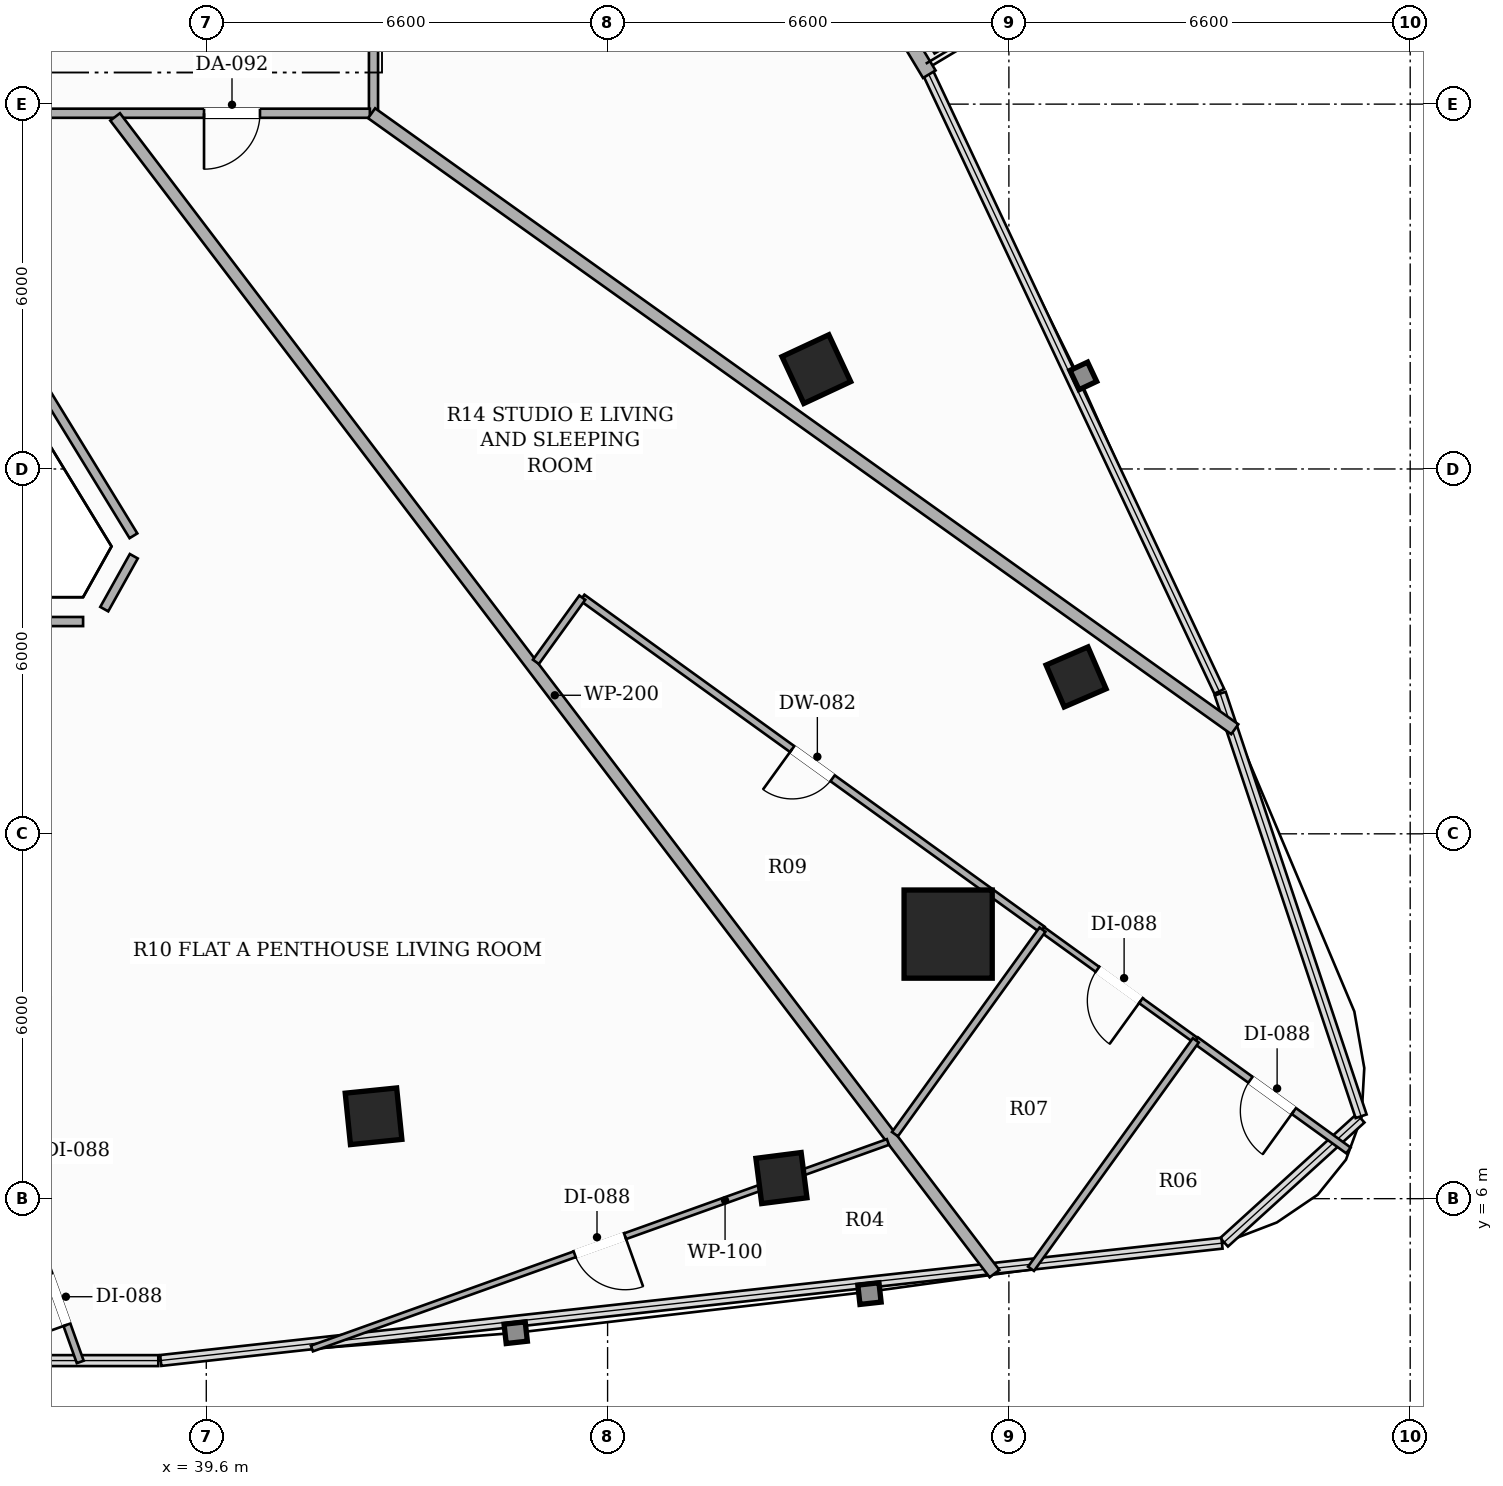
"""IFC4 building model, lengths in metres.
Left out: names, types, materials, properties, quantities, classifications, styles, units other than length and angle.
Written with IfcOpenShell. Run it as: python <this file> out.ifc"""

import sys

from ifc_helpers import new_model, si_unit, direction, frame, frame_2d, origin, origin_2d, place, context, subcontext, project, spatial, rectangle, hollow_rectangle, extrude, element, fill, save


model = new_model("IFC4")
c1 = context("Model", 3, precision=1e-05, world=origin(), true_north=direction((0.0, 1.0)))
c2 = subcontext(c1, "Body", "Model", "MODEL_VIEW")
j1 = project(units=[si_unit("LENGTHUNIT", "METRE"), si_unit("PLANEANGLEUNIT", "RADIAN")], contexts=[c1])
p1 = place(None, origin())
s1 = spatial("IfcSite", under=j1, at=p1, CompositionType="ELEMENT")
p2 = place(p1, origin())
s2 = spatial("IfcBuilding", under=s1, at=p2, CompositionType="ELEMENT")
p3 = place(p2, frame((0.0, 0.0, 143.0)))
s3 = spatial("IfcBuildingStorey", under=s2, at=p3, CompositionType="ELEMENT", Elevation=143.0)
p4 = place(p3, frame((51.801, 10.351, 0.0), z_axis=(0.0, 0.0, 1.0), x_axis=(1.0, 0.0, 0.0)))
e1 = element("IfcColumn", 1, at=p4, inside=s3, PredefinedType="COLUMN", context=c2, shape_type="SweptSolid", body=[
    extrude(hollow_rectangle(XDim=1.45, YDim=1.45, WallThickness=0.045, at=origin_2d()), origin(), (0.0, 0.0, 1.0), 3.3),
])
for number, where, z_axis, x_axis in (
    (2, (42.351, 7.355, 0.0), (0.0, 0.0, 1.0), (0.995, 0.101, 0.0)),
    (3, (49.633, 19.642, 0.0), (0.0, 0.0, 1.0), (-0.423, 0.906, 0.0)),
):
    element("IfcColumn", number, at=place(p3, frame(where, z_axis=z_axis, x_axis=x_axis)), inside=s3, PredefinedType="COLUMN", context=c2, shape_type="SweptSolid", body=[
        extrude(hollow_rectangle(XDim=0.85, YDim=0.85, WallThickness=0.028, at=origin_2d()), origin(), (0.0, 0.0, 1.0), 3.3),
    ])
for number, where, z_axis, x_axis in (
    (4, (49.059, 6.339, 0.0), (0.0, 0.0, 1.0), (0.992, 0.127, 0.0)),
    (5, (53.905, 14.58, 0.0), (0.0, 0.0, 1.0), (-0.397, 0.918, 0.0)),
):
    element("IfcColumn", number, at=place(p3, frame(where, z_axis=z_axis, x_axis=x_axis)), inside=s3, PredefinedType="COLUMN", context=c2, shape_type="SweptSolid", body=[
        extrude(hollow_rectangle(XDim=0.75, YDim=0.75, WallThickness=0.025, at=origin_2d()), origin(), (0.0, 0.0, 1.0), 3.3),
    ])
p5 = place(p3, frame((51.491, 24.492, 0.0), z_axis=(0.0, 0.0, 1.0), x_axis=(-0.514364263751, 0.857571807009, 0.0)))
e6 = element("IfcWall", 6, at=p5, inside=s3, PredefinedType="SOLIDWALL", context=c2, shape_type="SweptSolid", body=[
    extrude(rectangle(XDim=11.468, YDim=0.24, at=frame_2d((5.734, 0.0))), origin(), (0.0, 0.0, 1.0), 2.584),
])
p6 = place(p5, frame((8.972, 0.0, 0.0)))
e7 = element("IfcOpeningElement", 7, at=p6, cuts=e6, PredefinedType="OPENING", context=c2, shape_type="SweptSolid", body=[
    extrude(rectangle(XDim=1.8, YDim=2.2, at=frame_2d((0.9, 1.1))), frame((0.0, 0.13, 0.0), z_axis=(0.0, -1.0, 0.0), x_axis=(1.0, 0.0, 0.0)), (0.0, 0.0, 1.0), 0.26),
])
p7 = place(p3, frame((42.35, 28.34, 0.0), z_axis=(0.0, 0.0, 1.0), x_axis=(0.0, -1.0, 0.0)))
e8 = element("IfcWall", 8, at=p7, inside=s3, PredefinedType="PARTITIONING", context=c2, shape_type="SweptSolid", body=[
    extrude(rectangle(XDim=4.49, YDim=0.15, at=frame_2d((2.245, 0.0))), origin(), (0.0, 0.0, 1.0), 2.681),
])
p8 = place(p7, frame((1.805, 0.0, 0.0)))
e9 = element("IfcOpeningElement", 9, at=p8, cuts=e8, PredefinedType="OPENING", context=c2, shape_type="SweptSolid", body=[
    extrude(rectangle(XDim=0.88, YDim=2.1, at=frame_2d((0.44, 1.05))), frame((0.0, 0.085, 0.0), z_axis=(0.0, -1.0, 0.0), x_axis=(1.0, 0.0, 0.0)), (0.0, 0.0, 1.0), 0.17),
])
p9 = place(p3, frame((42.29, 23.85, 0.0), z_axis=(0.0, 0.0, 1.0), x_axis=(-1.0, 0.0, 0.0)))
e10 = element("IfcWall", 10, at=p9, inside=s3, PredefinedType="PARTITIONING", context=c2, shape_type="SweptSolid", body=[
    extrude(rectangle(XDim=8.134, YDim=0.15, at=frame_2d((4.067, 0.0))), origin(), (0.0, 0.0, 1.0), 2.452),
])
p10 = place(p9, frame((5.546, 0.0, 0.0)))
e11 = element("IfcOpeningElement", 11, at=p10, cuts=e10, PredefinedType="OPENING", context=c2, shape_type="SweptSolid", body=[
    extrude(rectangle(XDim=0.92, YDim=2.15, at=frame_2d((0.46, 1.075))), frame((0.0, 0.085, 0.0), z_axis=(0.0, -1.0, 0.0), x_axis=(1.0, 0.0, 0.0)), (0.0, 0.0, 1.0), 0.17),
])
p11 = place(p9, frame((1.807, 0.0, 0.0)))
e12 = element("IfcOpeningElement", 12, at=p11, cuts=e10, PredefinedType="OPENING", context=c2, shape_type="SweptSolid", body=[
    extrude(rectangle(XDim=0.92, YDim=2.15, at=frame_2d((0.46, 1.075))), frame((0.0, 0.085, 0.0), z_axis=(0.0, -1.0, 0.0), x_axis=(1.0, 0.0, 0.0)), (0.0, 0.0, 1.0), 0.17),
])
p12 = place(p3, frame((34.188, 23.79, 0.0), z_axis=(0.0, 0.0, 1.0), x_axis=(0.521816809014, -0.853057570057, 0.0)))
e13 = element("IfcWall", 13, at=p12, inside=s3, PredefinedType="PARTITIONING", context=c2, shape_type="SweptSolid", body=[
    extrude(rectangle(XDim=8.076, YDim=0.15, at=frame_2d((4.038, 0.0))), origin(), (0.0, 0.0, 1.0), 2.681),
])
p13 = place(p3, frame((38.408, 16.565, 0.0), z_axis=(0.0, 0.0, 1.0), x_axis=(-0.48761814532, -0.873057010942, 0.0)))
e14 = element("IfcWall", 14, at=p13, inside=s3, PredefinedType="PARTITIONING", context=c2, shape_type="SweptSolid", body=[
    extrude(rectangle(XDim=0.996, YDim=0.15, at=frame_2d((0.498, 0.0))), origin(), (0.0, 0.0, 1.0), 3.02),
])
p14 = place(p3, frame((37.574, 15.491, 0.0), z_axis=(0.0, 0.0, 1.0), x_axis=(-1.0, 0.0, 0.0)))
e15 = element("IfcWall", 15, at=p14, inside=s3, PredefinedType="PARTITIONING", context=c2, shape_type="SweptSolid", body=[
    extrude(rectangle(XDim=9.148, YDim=0.15, at=frame_2d((4.574, 0.0))), origin(), (0.0, 0.0, 1.0), 2.681),
])
p15 = place(p3, frame((38.101, 23.79, 0.0), z_axis=(0.0, 0.0, 1.0), x_axis=(0.605201904092, -0.796072016393, 0.0)))
e16 = element("IfcWall", 16, at=p15, inside=s3, PredefinedType="PARTITIONING", context=c2, shape_type="SweptSolid", body=[
    extrude(rectangle(XDim=23.896, YDim=0.2, at=frame_2d((11.948, 0.0))), origin(), (0.0, 0.0, 1.0), 2.373),
])
p16 = place(p3, frame((56.515, 13.72, 0.0), z_axis=(0.0, 0.0, 1.0), x_axis=(-0.813997291107, 0.580868668522, 0.0)))
e17 = element("IfcWall", 17, at=p16, inside=s3, PredefinedType="PARTITIONING", context=c2, shape_type="SweptSolid", body=[
    extrude(rectangle(XDim=17.44, YDim=0.2, at=frame_2d((8.72, 0.0))), origin(), (0.0, 0.0, 1.0), 2.373),
])
p17 = place(p3, frame((37.527, 3.315, 0.0), z_axis=(0.0, 0.0, 1.0), x_axis=(-0.337393850622, 0.9413635799, 0.0)))
e18 = element("IfcWall", 18, at=p17, inside=s3, PredefinedType="PARTITIONING", context=c2, shape_type="SweptSolid", body=[
    extrude(rectangle(XDim=2.179, YDim=0.12, at=frame_2d((1.089, 0.0))), origin(), (0.0, 0.0, 1.0), 3.02),
])
p18 = place(p17, frame((0.649, 0.0, 0.0)))
e19 = element("IfcOpeningElement", 19, at=p18, cuts=e18, PredefinedType="OPENING", context=c2, shape_type="SweptSolid", body=[
    extrude(rectangle(XDim=0.88, YDim=2.1, at=frame_2d((0.44, 1.05))), frame((0.0, 0.07, 0.0), z_axis=(0.0, -1.0, 0.0), x_axis=(1.0, 0.0, 0.0)), (0.0, 0.0, 1.0), 0.14),
])
p19 = place(p3, frame((50.81, 6.932, 0.0), z_axis=(0.0, 0.0, 1.0), x_axis=(-0.941340567411, -0.337458050943, 0.0)))
e20 = element("IfcWall", 20, at=p19, inside=s3, PredefinedType="PARTITIONING", context=c2, shape_type="SweptSolid", body=[
    extrude(rectangle(XDim=10.063, YDim=0.1, at=frame_2d((5.032, 0.0))), origin(), (0.0, 0.0, 1.0), 2.373),
])
p20 = place(p19, frame((4.592, 0.0, 0.0)))
e21 = element("IfcOpeningElement", 21, at=p20, cuts=e20, PredefinedType="OPENING", context=c2, shape_type="SweptSolid", body=[
    extrude(rectangle(XDim=0.88, YDim=2.1, at=frame_2d((0.44, 1.05))), frame((0.0, 0.06, 0.0), z_axis=(0.0, -1.0, 0.0), x_axis=(1.0, 0.0, 0.0)), (0.0, 0.0, 1.0), 0.12),
])
p21 = place(p3, frame((53.352, 10.424, 0.0), z_axis=(0.0, 0.0, 1.0), x_axis=(-0.810979209295, 0.585074971343, 0.0)))
e22 = element("IfcWall", 22, at=p21, inside=s3, PredefinedType="PARTITIONING", context=c2, shape_type="SweptSolid", body=[
    extrude(rectangle(XDim=9.332, YDim=0.12, at=frame_2d((4.666, 0.0))), origin(), (0.0, 0.0, 1.0), 2.373),
])
p22 = place(p21, frame((4.256, 0.0, 0.0)))
e23 = element("IfcOpeningElement", 23, at=p22, cuts=e22, PredefinedType="OPENING", context=c2, shape_type="SweptSolid", body=[
    extrude(rectangle(XDim=0.82, YDim=2.1, at=frame_2d((0.41, 1.05))), frame((0.0, 0.07, 0.0), z_axis=(0.0, -1.0, 0.0), x_axis=(1.0, 0.0, 0.0)), (0.0, 0.0, 1.0), 0.14),
])
p23 = place(p3, frame((45.784, 15.884, 0.0), z_axis=(0.0, 0.0, 1.0), x_axis=(-0.58557264979, -0.810619930558, 0.0)))
e24 = element("IfcWall", 24, at=p23, inside=s3, PredefinedType="PARTITIONING", context=c2, shape_type="SweptSolid", body=[
    extrude(rectangle(XDim=1.303, YDim=0.12, at=frame_2d((0.651, 0.0))), origin(), (0.0, 0.0, 1.0), 2.681),
])
p24 = place(p3, frame((58.385, 6.793, 0.0), z_axis=(0.0, 0.0, 1.0), x_axis=(-0.811055436316, 0.584969297675, 0.0)))
e25 = element("IfcWall", 25, at=p24, inside=s3, PredefinedType="PARTITIONING", context=c2, shape_type="SweptSolid", body=[
    extrude(rectangle(XDim=3.096, YDim=0.12, at=frame_2d((1.548, 0.0))), origin(), (0.0, 0.0, 1.0), 3.02),
])
p25 = place(p24, frame((1.108, 0.0, 0.0)))
e26 = element("IfcOpeningElement", 26, at=p25, cuts=e25, PredefinedType="OPENING", context=c2, shape_type="SweptSolid", body=[
    extrude(rectangle(XDim=0.88, YDim=2.1, at=frame_2d((0.44, 1.05))), frame((0.0, 0.07, 0.0), z_axis=(0.0, -1.0, 0.0), x_axis=(1.0, 0.0, 0.0)), (0.0, 0.0, 1.0), 0.14),
])
p26 = place(p3, frame((55.874, 8.604, 0.0), z_axis=(0.0, 0.0, 1.0), x_axis=(-0.810886170902, 0.585203911333, 0.0)))
e27 = element("IfcWall", 27, at=p26, inside=s3, PredefinedType="PARTITIONING", context=c2, shape_type="SweptSolid", body=[
    extrude(rectangle(XDim=3.11, YDim=0.1, at=frame_2d((1.555, 0.0))), origin(), (0.0, 0.0, 1.0), 2.579),
])
p27 = place(p26, frame((1.115, 0.0, 0.0)))
e28 = element("IfcOpeningElement", 28, at=p27, cuts=e27, PredefinedType="OPENING", context=c2, shape_type="SweptSolid", body=[
    extrude(rectangle(XDim=0.88, YDim=2.1, at=frame_2d((0.44, 1.05))), frame((0.0, 0.06, 0.0), z_axis=(0.0, -1.0, 0.0), x_axis=(1.0, 0.0, 0.0)), (0.0, 0.0, 1.0), 0.12),
])
p28 = place(p3, frame((53.352, 10.424, 0.0), z_axis=(0.0, 0.0, 1.0), x_axis=(-0.585041198475, -0.811003573412, 0.0)))
e29 = element("IfcWall", 29, at=p28, inside=s3, PredefinedType="PARTITIONING", context=c2, shape_type="SweptSolid", body=[
    extrude(rectangle(XDim=4.147, YDim=0.12, at=frame_2d((2.073, 0.0))), origin(), (0.0, 0.0, 1.0), 2.579),
])
p29 = place(p3, frame((53.164, 4.847, 0.0), z_axis=(0.0, 0.0, 1.0), x_axis=(0.58499591955, 0.81103623477, 0.0)))
e30 = element("IfcWall", 30, at=p29, inside=s3, PredefinedType="PARTITIONING", context=c2, shape_type="SweptSolid", body=[
    extrude(rectangle(XDim=4.632, YDim=0.12, at=frame_2d((2.316, 0.0))), origin(), (0.0, 0.0, 1.0), 3.02),
])
p30 = place(p18, origin())
e31 = element("IfcDoor", 31, at=p30, inside=s3, OperationType="SINGLE_SWING_LEFT", PredefinedType="DOOR", context=c2, shape_type="SweptSolid", body=[
    extrude(rectangle(XDim=0.88, YDim=2.1, at=frame_2d((0.44, 1.05))), frame((0.0, 0.025, 0.0), z_axis=(0.0, -1.0, 0.0), x_axis=(1.0, 0.0, 0.0)), (0.0, 0.0, 1.0), 0.05),
])
fill(e19, e31)
p31 = place(p20, origin())
e32 = element("IfcDoor", 32, at=p31, inside=s3, OperationType="SINGLE_SWING_LEFT", PredefinedType="DOOR", context=c2, shape_type="SweptSolid", body=[
    extrude(rectangle(XDim=0.88, YDim=2.1, at=frame_2d((0.44, 1.05))), frame((0.0, 0.025, 0.0), z_axis=(0.0, -1.0, 0.0), x_axis=(1.0, 0.0, 0.0)), (0.0, 0.0, 1.0), 0.05),
])
fill(e21, e32)
p32 = place(p11, origin())
e33 = element("IfcDoor", 33, at=p32, inside=s3, OperationType="SINGLE_SWING_RIGHT", PredefinedType="DOOR", context=c2, shape_type="SweptSolid", body=[
    extrude(rectangle(XDim=0.92, YDim=2.15, at=frame_2d((0.46, 1.075))), frame((0.0, 0.025, 0.0), z_axis=(0.0, -1.0, 0.0), x_axis=(1.0, 0.0, 0.0)), (0.0, 0.0, 1.0), 0.05),
])
fill(e12, e33)
p33 = place(p22, origin())
e34 = element("IfcDoor", 34, at=p33, inside=s3, OperationType="SINGLE_SWING_RIGHT", PredefinedType="DOOR", context=c2, shape_type="SweptSolid", body=[
    extrude(rectangle(XDim=0.82, YDim=2.1, at=frame_2d((0.41, 1.05))), frame((0.0, 0.025, 0.0), z_axis=(0.0, -1.0, 0.0), x_axis=(1.0, 0.0, 0.0)), (0.0, 0.0, 1.0), 0.05),
])
fill(e23, e34)
p34 = place(p25, origin())
e35 = element("IfcDoor", 35, at=p34, inside=s3, OperationType="SINGLE_SWING_LEFT", PredefinedType="DOOR", context=c2, shape_type="SweptSolid", body=[
    extrude(rectangle(XDim=0.88, YDim=2.1, at=frame_2d((0.44, 1.05))), frame((0.0, 0.025, 0.0), z_axis=(0.0, -1.0, 0.0), x_axis=(1.0, 0.0, 0.0)), (0.0, 0.0, 1.0), 0.05),
])
fill(e26, e35)
p35 = place(p27, origin())
e36 = element("IfcDoor", 36, at=p35, inside=s3, OperationType="SINGLE_SWING_LEFT", PredefinedType="DOOR", context=c2, shape_type="SweptSolid", body=[
    extrude(rectangle(XDim=0.88, YDim=2.1, at=frame_2d((0.44, 1.05))), frame((0.0, 0.025, 0.0), z_axis=(0.0, -1.0, 0.0), x_axis=(1.0, 0.0, 0.0)), (0.0, 0.0, 1.0), 0.05),
])
fill(e28, e36)
save(model, sys.argv[1])
